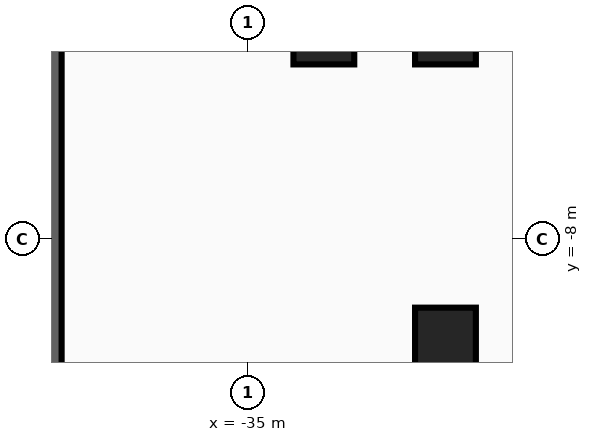
"""IFC4 building model, lengths in metres.
Left out: names, types, materials, properties, quantities, classifications, styles, units other than length and angle.
Written with IfcOpenShell. Run it as: python <this file> out.ifc"""

import sys

from ifc_helpers import new_model, si_unit, direction, frame, frame_2d, origin, origin_2d, place, context, subcontext, project, spatial, rectangle, extrude, source, transform, mapped, element, save


model = new_model("IFC4")
c1 = context("Model", 3, precision=1e-05, world=origin(), true_north=direction((0.0, 1.0)))
c2 = subcontext(c1, "Body", "Model", "MODEL_VIEW")
j1 = project(units=[si_unit("LENGTHUNIT", "METRE"), si_unit("PLANEANGLEUNIT", "RADIAN")], contexts=[c1])
p1 = place(None, origin())
s1 = spatial("IfcSite", under=j1, at=p1, CompositionType="ELEMENT")
p2 = place(p1, origin())
s2 = spatial("IfcBuilding", under=s1, at=p2, CompositionType="ELEMENT")
p3 = place(p2, frame((0.0, 0.0, -4.8)))
s3 = spatial("IfcBuildingStorey", under=s2, at=p3, CompositionType="ELEMENT", Elevation=-4.8)
p4 = place(p3, frame((-40.2, -27.9, 0.0), z_axis=(0.0, 0.0, 1.0), x_axis=(0.0, 1.0, 0.0)))
e1 = element("IfcWall", 1, at=p4, inside=s3, PredefinedType="SOLIDWALL", context=c2, shape_type="SweptSolid", body=[
    extrude(rectangle(XDim=55.8, YDim=0.6, at=frame_2d((27.9, 0.0))), origin(), (0.0, 0.0, 1.0), 4.52),
])
m1 = source(origin(), c2, "Body", "SweptSolid", [
    extrude(rectangle(XDim=1.6, YDim=1.6, at=origin_2d()), origin(), (0.0, 0.0, 1.0), 4.8),
])
for number, where, z_axis, x_axis in (
    (2, (-29.8, -10.6, 0.0), (0.0, 0.0, 1.0), (1.0, 0.0, 0.0)),
    (3, (-29.8, -2.6, 0.0), (0.0, 0.0, 1.0), (1.0, 0.0, 0.0)),
    (4, (-33.0, -2.6, 0.0), (0.0, 0.0, 1.0), (1.0, 0.0, 0.0)),
):
    element("IfcColumn", number, at=place(p3, frame(where, z_axis=z_axis, x_axis=x_axis)), inside=s3, PredefinedType="COLUMN", context=c2, shape_type="MappedRepresentation", body=[
        mapped(m1, transform((0.0, 0.0, 0.0), x_axis=(1.0, 0.0, 0.0), y_axis=(0.0, 1.0, 0.0), z_axis=(0.0, 0.0, 1.0), scale=1.0)),
    ])
save(model, sys.argv[1])
